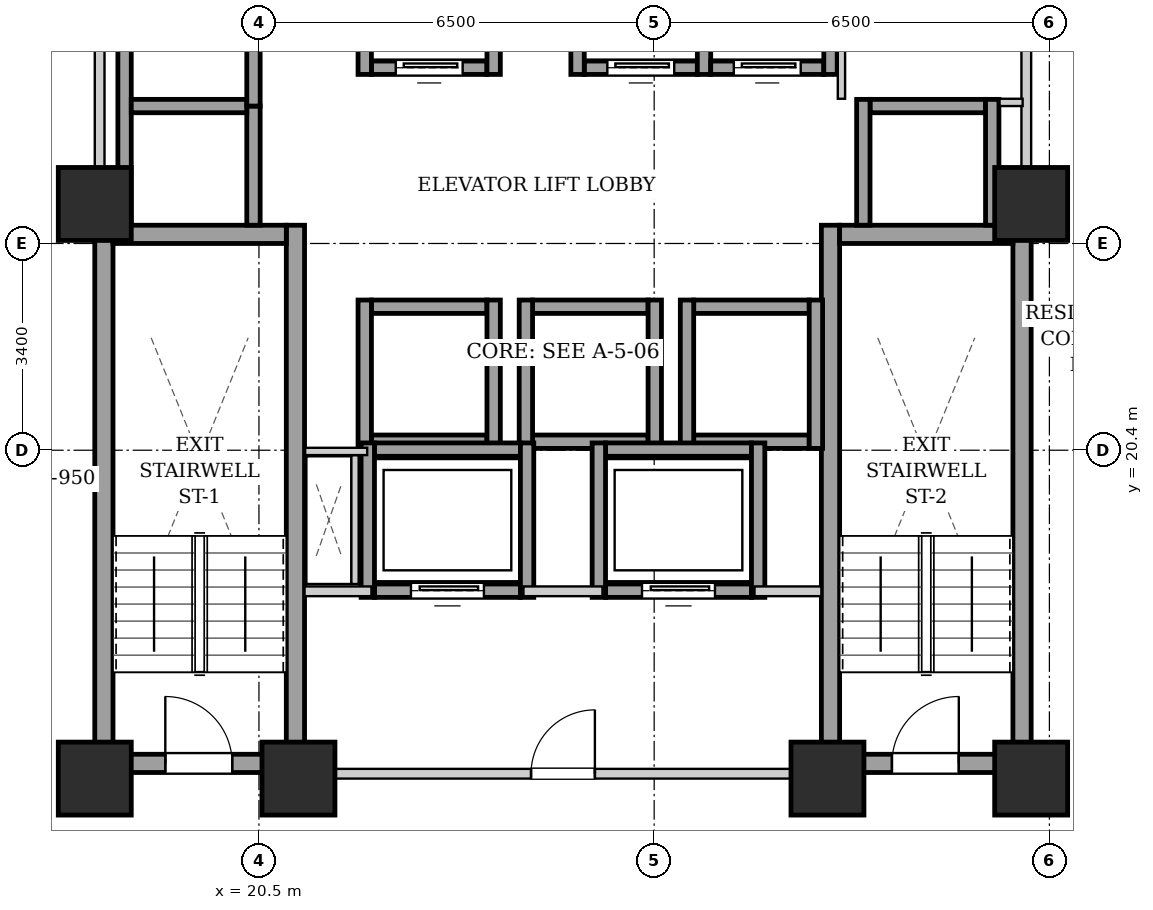
"""IFC4 building model, lengths in metres.
Left out: names, types, materials, properties, quantities, classifications, styles, units other than length and angle.
Written with IfcOpenShell. Run it as: python <this file> out.ifc"""

import sys

from ifc_helpers import new_model, si_unit, direction, frame, frame_2d, origin, origin_2d, place, context, subcontext, project, spatial, rectangle, extrude, element, fill, save


model = new_model("IFC4")
c1 = context("Model", 3, precision=1e-05, world=origin(), true_north=direction((0.0, 1.0)))
c2 = subcontext(c1, "Body", "Model", "MODEL_VIEW")
j1 = project(units=[si_unit("LENGTHUNIT", "METRE"), si_unit("PLANEANGLEUNIT", "RADIAN")], contexts=[c1])
p1 = place(None, origin())
s1 = spatial("IfcSite", under=j1, at=p1, CompositionType="ELEMENT")
p2 = place(p1, origin())
s2 = spatial("IfcBuilding", under=s1, at=p2, CompositionType="ELEMENT")
p3 = place(p2, frame((0.0, 0.0, 29.0)))
s3 = spatial("IfcBuildingStorey", under=s2, at=p3, CompositionType="ELEMENT", Elevation=29.0)
for number, where, z_axis, x_axis in (
    (1, (17.8, 15.0, 0.0), (0.0, 0.0, 1.0), (1.0, 0.0, 0.0)),
    (2, (21.15, 15.0, 0.0), (0.0, 0.0, 1.0), (1.0, 0.0, 0.0)),
    (3, (29.85, 15.0, 0.0), (0.0, 0.0, 1.0), (1.0, 0.0, 0.0)),
    (4, (33.2, 15.0, 0.0), (0.0, 0.0, 1.0), (1.0, 0.0, 0.0)),
    (5, (17.8, 24.45, 0.0), (0.0, 0.0, 1.0), (1.0, 0.0, 0.0)),
    (6, (33.2, 24.45, 0.0), (0.0, 0.0, 1.0), (1.0, 0.0, 0.0)),
):
    element("IfcColumn", number, at=place(p3, frame(where, z_axis=z_axis, x_axis=x_axis)), inside=s3, PredefinedType="COLUMN", context=c2, shape_type="SweptSolid", body=[
        extrude(rectangle(XDim=1.2, YDim=1.2, at=origin_2d()), origin(), (0.0, 0.0, 1.0), 3.2),
    ])
for number, where, z_axis, x_axis in (
    (7, (17.95, 15.1, 0.0), (0.0, 0.0, 1.0), (0.0, 1.0, 0.0)),
    (8, (21.1, 15.1, 0.0), (0.0, 0.0, 1.0), (0.0, 1.0, 0.0)),
):
    element("IfcWall", number, at=place(p3, frame(where, z_axis=z_axis, x_axis=x_axis)), inside=s3, PredefinedType="SHEAR", context=c2, shape_type="SweptSolid", body=[
        extrude(rectangle(XDim=9.0, YDim=0.3, at=frame_2d((4.5, 0.0))), origin(), (0.0, 0.0, 1.0), 2.94),
    ])
p4 = place(p3, frame((18.1, 23.95, 0.0), z_axis=(0.0, 0.0, 1.0), x_axis=(1.0, 0.0, 0.0)))
e9 = element("IfcWall", 9, at=p4, inside=s3, PredefinedType="SHEAR", context=c2, shape_type="SweptSolid", body=[
    extrude(rectangle(XDim=2.85, YDim=0.3, at=frame_2d((1.425, 0.0))), origin(), (0.0, 0.0, 1.0), 2.94),
])
p5 = place(p3, frame((18.1, 15.25, 0.0), z_axis=(0.0, 0.0, 1.0), x_axis=(1.0, 0.0, 0.0)))
e10 = element("IfcWall", 10, at=p5, inside=s3, PredefinedType="SHEAR", context=c2, shape_type="SweptSolid", body=[
    extrude(rectangle(XDim=2.85, YDim=0.3, at=frame_2d((1.425, 0.0))), origin(), (0.0, 0.0, 1.0), 2.94),
])
p6 = place(p5, frame((0.86, 0.0, 0.0)))
e11 = element("IfcOpeningElement", 11, at=p6, cuts=e10, PredefinedType="OPENING", context=c2, shape_type="SweptSolid", body=[
    extrude(rectangle(XDim=1.1, YDim=2.05, at=frame_2d((0.55, 1.025))), frame((0.0, 0.16, 0.0), z_axis=(0.0, -1.0, 0.0), x_axis=(1.0, 0.0, 0.0)), (0.0, 0.0, 1.0), 0.32),
])
for number, where, z_axis, x_axis in (
    (12, (29.9, 15.1, 0.0), (0.0, 0.0, 1.0), (0.0, 1.0, 0.0)),
    (13, (33.05, 15.1, 0.0), (0.0, 0.0, 1.0), (0.0, 1.0, 0.0)),
):
    element("IfcWall", number, at=place(p3, frame(where, z_axis=z_axis, x_axis=x_axis)), inside=s3, PredefinedType="SHEAR", context=c2, shape_type="SweptSolid", body=[
        extrude(rectangle(XDim=9.0, YDim=0.3, at=frame_2d((4.5, 0.0))), origin(), (0.0, 0.0, 1.0), 2.94),
    ])
p7 = place(p3, frame((30.05, 23.95, 0.0), z_axis=(0.0, 0.0, 1.0), x_axis=(1.0, 0.0, 0.0)))
e14 = element("IfcWall", 14, at=p7, inside=s3, PredefinedType="SHEAR", context=c2, shape_type="SweptSolid", body=[
    extrude(rectangle(XDim=2.85, YDim=0.3, at=frame_2d((1.425, 0.0))), origin(), (0.0, 0.0, 1.0), 2.94),
])
p8 = place(p3, frame((30.05, 15.25, 0.0), z_axis=(0.0, 0.0, 1.0), x_axis=(1.0, 0.0, 0.0)))
e15 = element("IfcWall", 15, at=p8, inside=s3, PredefinedType="SHEAR", context=c2, shape_type="SweptSolid", body=[
    extrude(rectangle(XDim=2.85, YDim=0.3, at=frame_2d((1.425, 0.0))), origin(), (0.0, 0.0, 1.0), 2.94),
])
p9 = place(p8, frame((0.86, 0.0, 0.0)))
e16 = element("IfcOpeningElement", 16, at=p9, cuts=e15, PredefinedType="OPENING", context=c2, shape_type="SweptSolid", body=[
    extrude(rectangle(XDim=1.1, YDim=2.05, at=frame_2d((0.55, 1.025))), frame((0.0, 0.16, 0.0), z_axis=(0.0, -1.0, 0.0), x_axis=(1.0, 0.0, 0.0)), (0.0, 0.0, 1.0), 0.32),
])
p10 = place(p3, frame((22.35, 26.69, 0.0), z_axis=(0.0, 0.0, 1.0), x_axis=(1.0, 0.0, 0.0)))
e17 = element("IfcWall", 17, at=p10, inside=s3, PredefinedType="SHEAR", context=c2, shape_type="SweptSolid", body=[
    extrude(rectangle(XDim=1.9, YDim=0.22, at=frame_2d((0.95, 0.0))), origin(), (0.0, 0.0, 1.0), 2.94),
])
p11 = place(p10, frame((0.4, 0.0, 0.0)))
e18 = element("IfcOpeningElement", 18, at=p11, cuts=e17, PredefinedType="OPENING", context=c2, shape_type="SweptSolid", body=[
    extrude(rectangle(XDim=1.1, YDim=2.15, at=frame_2d((0.55, 1.075))), frame((0.0, 0.12, 0.0), z_axis=(0.0, -1.0, 0.0), x_axis=(1.0, 0.0, 0.0)), (0.0, 0.0, 1.0), 0.24),
])
for number, where, z_axis, x_axis in (
    (19, (22.24, 26.58, 0.0), (0.0, 0.0, 1.0), (0.0, 1.0, 0.0)),
    (20, (24.36, 26.58, 0.0), (0.0, 0.0, 1.0), (0.0, 1.0, 0.0)),
):
    element("IfcWall", number, at=place(p3, frame(where, z_axis=z_axis, x_axis=x_axis)), inside=s3, PredefinedType="SHEAR", context=c2, shape_type="SweptSolid", body=[
        extrude(rectangle(XDim=2.44, YDim=0.22, at=frame_2d((1.22, 0.0))), origin(), (0.0, 0.0, 1.0), 2.94),
    ])
p12 = place(p3, frame((25.85, 26.69, 0.0), z_axis=(0.0, 0.0, 1.0), x_axis=(1.0, 0.0, 0.0)))
e21 = element("IfcWall", 21, at=p12, inside=s3, PredefinedType="SHEAR", context=c2, shape_type="SweptSolid", body=[
    extrude(rectangle(XDim=1.86, YDim=0.22, at=frame_2d((0.93, 0.0))), origin(), (0.0, 0.0, 1.0), 2.94),
])
p13 = place(p12, frame((0.38, 0.0, 0.0)))
e22 = element("IfcOpeningElement", 22, at=p13, cuts=e21, PredefinedType="OPENING", context=c2, shape_type="SweptSolid", body=[
    extrude(rectangle(XDim=1.1, YDim=2.15, at=frame_2d((0.55, 1.075))), frame((0.0, 0.12, 0.0), z_axis=(0.0, -1.0, 0.0), x_axis=(1.0, 0.0, 0.0)), (0.0, 0.0, 1.0), 0.24),
])
for number, where, z_axis, x_axis in (
    (23, (25.74, 26.58, 0.0), (0.0, 0.0, 1.0), (0.0, 1.0, 0.0)),
    (24, (27.82, 26.58, 0.0), (0.0, 0.0, 1.0), (0.0, 1.0, 0.0)),
):
    element("IfcWall", number, at=place(p3, frame(where, z_axis=z_axis, x_axis=x_axis)), inside=s3, PredefinedType="SHEAR", context=c2, shape_type="SweptSolid", body=[
        extrude(rectangle(XDim=2.44, YDim=0.22, at=frame_2d((1.22, 0.0))), origin(), (0.0, 0.0, 1.0), 2.94),
    ])
p14 = place(p3, frame((27.93, 26.69, 0.0), z_axis=(0.0, 0.0, 1.0), x_axis=(1.0, 0.0, 0.0)))
e25 = element("IfcWall", 25, at=p14, inside=s3, PredefinedType="SHEAR", context=c2, shape_type="SweptSolid", body=[
    extrude(rectangle(XDim=1.86, YDim=0.22, at=frame_2d((0.93, 0.0))), origin(), (0.0, 0.0, 1.0), 2.94),
])
p15 = place(p14, frame((0.38, 0.0, 0.0)))
e26 = element("IfcOpeningElement", 26, at=p15, cuts=e25, PredefinedType="OPENING", context=c2, shape_type="SweptSolid", body=[
    extrude(rectangle(XDim=1.1, YDim=2.15, at=frame_2d((0.55, 1.075))), frame((0.0, 0.12, 0.0), z_axis=(0.0, -1.0, 0.0), x_axis=(1.0, 0.0, 0.0)), (0.0, 0.0, 1.0), 0.24),
])
p16 = place(p3, frame((29.9, 26.58, 0.0), z_axis=(0.0, 0.0, 1.0), x_axis=(0.0, 1.0, 0.0)))
e27 = element("IfcWall", 27, at=p16, inside=s3, PredefinedType="SHEAR", context=c2, shape_type="SweptSolid", body=[
    extrude(rectangle(XDim=2.44, YDim=0.22, at=frame_2d((1.22, 0.0))), origin(), (0.0, 0.0, 1.0), 2.94),
])
for number, where, z_axis, x_axis in (
    (28, (22.35, 20.54, 0.0), (0.0, 0.0, 1.0), (1.0, 0.0, 0.0)),
    (29, (22.35, 22.76, 0.0), (0.0, 0.0, 1.0), (1.0, 0.0, 0.0)),
):
    element("IfcWall", number, at=place(p3, frame(where, z_axis=z_axis, x_axis=x_axis)), inside=s3, PredefinedType="SHEAR", context=c2, shape_type="SweptSolid", body=[
        extrude(rectangle(XDim=1.9, YDim=0.22, at=frame_2d((0.95, 0.0))), origin(), (0.0, 0.0, 1.0), 2.94),
    ])
for number, where, z_axis, x_axis in (
    (30, (22.24, 20.43, 0.0), (0.0, 0.0, 1.0), (0.0, 1.0, 0.0)),
    (31, (24.36, 20.43, 0.0), (0.0, 0.0, 1.0), (0.0, 1.0, 0.0)),
):
    element("IfcWall", number, at=place(p3, frame(where, z_axis=z_axis, x_axis=x_axis)), inside=s3, PredefinedType="SHEAR", context=c2, shape_type="SweptSolid", body=[
        extrude(rectangle(XDim=2.44, YDim=0.22, at=frame_2d((1.22, 0.0))), origin(), (0.0, 0.0, 1.0), 2.94),
    ])
for number, where, z_axis, x_axis in (
    (32, (25.0, 20.54, 0.0), (0.0, 0.0, 1.0), (1.0, 0.0, 0.0)),
    (33, (25.0, 22.76, 0.0), (0.0, 0.0, 1.0), (1.0, 0.0, 0.0)),
):
    element("IfcWall", number, at=place(p3, frame(where, z_axis=z_axis, x_axis=x_axis)), inside=s3, PredefinedType="SHEAR", context=c2, shape_type="SweptSolid", body=[
        extrude(rectangle(XDim=1.9, YDim=0.22, at=frame_2d((0.95, 0.0))), origin(), (0.0, 0.0, 1.0), 2.94),
    ])
for number, where, z_axis, x_axis in (
    (34, (24.89, 20.43, 0.0), (0.0, 0.0, 1.0), (0.0, 1.0, 0.0)),
    (35, (27.01, 20.43, 0.0), (0.0, 0.0, 1.0), (0.0, 1.0, 0.0)),
):
    element("IfcWall", number, at=place(p3, frame(where, z_axis=z_axis, x_axis=x_axis)), inside=s3, PredefinedType="SHEAR", context=c2, shape_type="SweptSolid", body=[
        extrude(rectangle(XDim=2.44, YDim=0.22, at=frame_2d((1.22, 0.0))), origin(), (0.0, 0.0, 1.0), 2.94),
    ])
for number, where, z_axis, x_axis in (
    (36, (27.65, 20.54, 0.0), (0.0, 0.0, 1.0), (1.0, 0.0, 0.0)),
    (37, (27.65, 22.76, 0.0), (0.0, 0.0, 1.0), (1.0, 0.0, 0.0)),
):
    element("IfcWall", number, at=place(p3, frame(where, z_axis=z_axis, x_axis=x_axis)), inside=s3, PredefinedType="SHEAR", context=c2, shape_type="SweptSolid", body=[
        extrude(rectangle(XDim=1.9, YDim=0.22, at=frame_2d((0.95, 0.0))), origin(), (0.0, 0.0, 1.0), 2.94),
    ])
for number, where, z_axis, x_axis in (
    (38, (27.54, 20.43, 0.0), (0.0, 0.0, 1.0), (0.0, 1.0, 0.0)),
    (39, (29.66, 20.43, 0.0), (0.0, 0.0, 1.0), (0.0, 1.0, 0.0)),
):
    element("IfcWall", number, at=place(p3, frame(where, z_axis=z_axis, x_axis=x_axis)), inside=s3, PredefinedType="SHEAR", context=c2, shape_type="SweptSolid", body=[
        extrude(rectangle(XDim=2.44, YDim=0.22, at=frame_2d((1.22, 0.0))), origin(), (0.0, 0.0, 1.0), 2.94),
    ])
p17 = place(p3, frame((18.29, 24.1, 0.0), z_axis=(0.0, 0.0, 1.0), x_axis=(0.0, 1.0, 0.0)))
e40 = element("IfcWall", 40, at=p17, inside=s3, PredefinedType="SHEAR", context=c2, shape_type="SweptSolid", body=[
    extrude(rectangle(XDim=4.14, YDim=0.22, at=frame_2d((2.07, 0.0))), origin(), (0.0, 0.0, 1.0), 2.94),
])
p18 = place(p3, frame((20.41, 24.1, 0.0), z_axis=(0.0, 0.0, 1.0), x_axis=(0.0, 1.0, 0.0)))
e41 = element("IfcWall", 41, at=p18, inside=s3, PredefinedType="SHEAR", context=c2, shape_type="SweptSolid", body=[
    extrude(rectangle(XDim=1.96, YDim=0.22, at=frame_2d((0.98, 0.0))), origin(), (0.0, 0.0, 1.0), 2.94),
])
p19 = place(p3, frame((18.4, 26.06, 0.0), z_axis=(0.0, 0.0, 1.0), x_axis=(1.0, 0.0, 0.0)))
e42 = element("IfcWall", 42, at=p19, inside=s3, PredefinedType="SHEAR", context=c2, shape_type="SweptSolid", body=[
    extrude(rectangle(XDim=1.9, YDim=0.22, at=frame_2d((0.95, 0.0))), origin(), (0.0, 0.0, 1.0), 2.94),
])
p20 = place(p3, frame((20.41, 26.06, 0.0), z_axis=(0.0, 0.0, 1.0), x_axis=(0.0, 1.0, 0.0)))
e43 = element("IfcWall", 43, at=p20, inside=s3, PredefinedType="SHEAR", context=c2, shape_type="SweptSolid", body=[
    extrude(rectangle(XDim=2.18, YDim=0.22, at=frame_2d((1.09, 0.0))), origin(), (0.0, 0.0, 1.0), 2.94),
])
p21 = place(p3, frame((30.55, 26.06, 0.0), z_axis=(0.0, 0.0, 1.0), x_axis=(1.0, 0.0, 0.0)))
e44 = element("IfcWall", 44, at=p21, inside=s3, PredefinedType="SHEAR", context=c2, shape_type="SweptSolid", body=[
    extrude(rectangle(XDim=1.9, YDim=0.22, at=frame_2d((0.95, 0.0))), origin(), (0.0, 0.0, 1.0), 2.94),
])
for number, where, z_axis, x_axis in (
    (45, (30.44, 24.1, 0.0), (0.0, 0.0, 1.0), (0.0, 1.0, 0.0)),
    (46, (32.56, 24.1, 0.0), (0.0, 0.0, 1.0), (0.0, 1.0, 0.0)),
):
    element("IfcWall", number, at=place(p3, frame(where, z_axis=z_axis, x_axis=x_axis)), inside=s3, PredefinedType="SHEAR", context=c2, shape_type="SweptSolid", body=[
        extrude(rectangle(XDim=2.07, YDim=0.22, at=frame_2d((1.035, 0.0))), origin(), (0.0, 0.0, 1.0), 2.94),
    ])
p22 = place(p3, frame((22.4, 18.09, 0.0), z_axis=(0.0, 0.0, 1.0), x_axis=(1.0, 0.0, 0.0)))
e47 = element("IfcWall", 47, at=p22, inside=s3, PredefinedType="SHEAR", context=c2, shape_type="SweptSolid", body=[
    extrude(rectangle(XDim=2.4, YDim=0.22, at=frame_2d((1.2, 0.0))), origin(), (0.0, 0.0, 1.0), 2.94),
])
p23 = place(p22, frame((0.6, 0.0, 0.0)))
e48 = element("IfcOpeningElement", 48, at=p23, cuts=e47, PredefinedType="OPENING", context=c2, shape_type="SweptSolid", body=[
    extrude(rectangle(XDim=1.2, YDim=2.15, at=frame_2d((0.6, 1.075))), frame((0.0, 0.12, 0.0), z_axis=(0.0, -1.0, 0.0), x_axis=(1.0, 0.0, 0.0)), (0.0, 0.0, 1.0), 0.24),
])
p24 = place(p3, frame((22.4, 20.41, 0.0), z_axis=(0.0, 0.0, 1.0), x_axis=(1.0, 0.0, 0.0)))
e49 = element("IfcWall", 49, at=p24, inside=s3, PredefinedType="SHEAR", context=c2, shape_type="SweptSolid", body=[
    extrude(rectangle(XDim=2.4, YDim=0.22, at=frame_2d((1.2, 0.0))), origin(), (0.0, 0.0, 1.0), 2.94),
])
for number, where, z_axis, x_axis in (
    (50, (22.29, 17.98, 0.0), (0.0, 0.0, 1.0), (0.0, 1.0, 0.0)),
    (51, (24.91, 17.98, 0.0), (0.0, 0.0, 1.0), (0.0, 1.0, 0.0)),
):
    element("IfcWall", number, at=place(p3, frame(where, z_axis=z_axis, x_axis=x_axis)), inside=s3, PredefinedType="SHEAR", context=c2, shape_type="SweptSolid", body=[
        extrude(rectangle(XDim=2.54, YDim=0.22, at=frame_2d((1.27, 0.0))), origin(), (0.0, 0.0, 1.0), 2.94),
    ])
p25 = place(p3, frame((26.2, 18.09, 0.0), z_axis=(0.0, 0.0, 1.0), x_axis=(1.0, 0.0, 0.0)))
e52 = element("IfcWall", 52, at=p25, inside=s3, PredefinedType="SHEAR", context=c2, shape_type="SweptSolid", body=[
    extrude(rectangle(XDim=2.4, YDim=0.22, at=frame_2d((1.2, 0.0))), origin(), (0.0, 0.0, 1.0), 2.94),
])
p26 = place(p25, frame((0.6, 0.0, 0.0)))
e53 = element("IfcOpeningElement", 53, at=p26, cuts=e52, PredefinedType="OPENING", context=c2, shape_type="SweptSolid", body=[
    extrude(rectangle(XDim=1.2, YDim=2.15, at=frame_2d((0.6, 1.075))), frame((0.0, 0.12, 0.0), z_axis=(0.0, -1.0, 0.0), x_axis=(1.0, 0.0, 0.0)), (0.0, 0.0, 1.0), 0.24),
])
p27 = place(p3, frame((26.2, 20.41, 0.0), z_axis=(0.0, 0.0, 1.0), x_axis=(1.0, 0.0, 0.0)))
e54 = element("IfcWall", 54, at=p27, inside=s3, PredefinedType="SHEAR", context=c2, shape_type="SweptSolid", body=[
    extrude(rectangle(XDim=2.4, YDim=0.22, at=frame_2d((1.2, 0.0))), origin(), (0.0, 0.0, 1.0), 2.94),
])
for number, where, z_axis, x_axis in (
    (55, (26.09, 17.98, 0.0), (0.0, 0.0, 1.0), (0.0, 1.0, 0.0)),
    (56, (28.71, 17.98, 0.0), (0.0, 0.0, 1.0), (0.0, 1.0, 0.0)),
):
    element("IfcWall", number, at=place(p3, frame(where, z_axis=z_axis, x_axis=x_axis)), inside=s3, PredefinedType="SHEAR", context=c2, shape_type="SweptSolid", body=[
        extrude(rectangle(XDim=2.54, YDim=0.22, at=frame_2d((1.27, 0.0))), origin(), (0.0, 0.0, 1.0), 2.94),
    ])
p28 = place(p3, frame((21.25, 15.08, 0.0), z_axis=(0.0, 0.0, 1.0), x_axis=(1.0, 0.0, 0.0)))
e57 = element("IfcWall", 57, at=p28, inside=s3, PredefinedType="PARTITIONING", context=c2, shape_type="SweptSolid", body=[
    extrude(rectangle(XDim=8.5, YDim=0.16, at=frame_2d((4.25, 0.0))), origin(), (0.0, 0.0, 1.0), 2.155),
])
p29 = place(p28, frame((3.725, 0.0, 0.0)))
e58 = element("IfcOpeningElement", 58, at=p29, cuts=e57, PredefinedType="OPENING", context=c2, shape_type="SweptSolid", body=[
    extrude(rectangle(XDim=1.05, YDim=2.05, at=frame_2d((0.525, 1.025))), frame((0.0, 0.09, 0.0), z_axis=(0.0, -1.0, 0.0), x_axis=(1.0, 0.0, 0.0)), (0.0, 0.0, 1.0), 0.18),
])
p30 = place(p3, frame((21.25, 18.08, 0.0), z_axis=(0.0, 0.0, 1.0), x_axis=(1.0, 0.0, 0.0)))
e59 = element("IfcWall", 59, at=p30, inside=s3, PredefinedType="PARTITIONING", context=c2, shape_type="SweptSolid", body=[
    extrude(rectangle(XDim=1.1, YDim=0.16, at=frame_2d((0.55, 0.0))), origin(), (0.0, 0.0, 1.0), 2.94),
])
p31 = place(p3, frame((24.85, 18.08, 0.0), z_axis=(0.0, 0.0, 1.0), x_axis=(1.0, 0.0, 0.0)))
e60 = element("IfcWall", 60, at=p31, inside=s3, PredefinedType="PARTITIONING", context=c2, shape_type="SweptSolid", body=[
    extrude(rectangle(XDim=1.3, YDim=0.16, at=frame_2d((0.65, 0.0))), origin(), (0.0, 0.0, 1.0), 2.94),
])
p32 = place(p3, frame((28.65, 18.08, 0.0), z_axis=(0.0, 0.0, 1.0), x_axis=(1.0, 0.0, 0.0)))
e61 = element("IfcWall", 61, at=p32, inside=s3, PredefinedType="PARTITIONING", context=c2, shape_type="SweptSolid", body=[
    extrude(rectangle(XDim=1.1, YDim=0.16, at=frame_2d((0.55, 0.0))), origin(), (0.0, 0.0, 1.0), 2.94),
])
for number, where, z_axis, x_axis in (
    (62, (17.88, 24.12, 0.0), (0.0, 0.0, 1.0), (0.0, 1.0, 0.0)),
    (63, (33.12, 24.12, 0.0), (0.0, 0.0, 1.0), (0.0, 1.0, 0.0)),
):
    element("IfcWall", number, at=place(p3, frame(where, z_axis=z_axis, x_axis=x_axis)), inside=s3, PredefinedType="PARTITIONING", context=c2, shape_type="SweptSolid", body=[
        extrude(rectangle(XDim=4.76, YDim=0.16, at=frame_2d((2.38, 0.0))), origin(), (0.0, 0.0, 1.0), 2.275),
    ])
p33 = place(p3, frame((22.08, 18.2, 0.0), z_axis=(0.0, 0.0, 1.0), x_axis=(0.0, 1.0, 0.0)))
e64 = element("IfcWall", 64, at=p33, inside=s3, PredefinedType="PARTITIONING", context=c2, shape_type="SweptSolid", body=[
    extrude(rectangle(XDim=2.12, YDim=0.12, at=frame_2d((1.06, 0.0))), origin(), (0.0, 0.0, 1.0), 2.94),
])
p34 = place(p3, frame((22.28, 20.38, 0.0), z_axis=(0.0, 0.0, 1.0), x_axis=(-1.0, 0.0, 0.0)))
e65 = element("IfcWall", 65, at=p34, inside=s3, PredefinedType="PARTITIONING", context=c2, shape_type="SweptSolid", body=[
    extrude(rectangle(XDim=1.02, YDim=0.12, at=frame_2d((0.51, 0.0))), origin(), (0.0, 0.0, 1.0), 2.94),
])
p35 = place(p3, frame((30.08, 26.18, 0.0), z_axis=(0.0, 0.0, 1.0), x_axis=(0.0, 1.0, 0.0)))
e66 = element("IfcWall", 66, at=p35, inside=s3, PredefinedType="PARTITIONING", context=c2, shape_type="SweptSolid", body=[
    extrude(rectangle(XDim=2.68, YDim=0.12, at=frame_2d((1.34, 0.0))), origin(), (0.0, 0.0, 1.0), 2.94),
])
p36 = place(p3, frame((32.68, 26.12, 0.0), z_axis=(0.0, 0.0, 1.0), x_axis=(1.0, 0.0, 0.0)))
e67 = element("IfcWall", 67, at=p36, inside=s3, PredefinedType="PARTITIONING", context=c2, shape_type="SweptSolid", body=[
    extrude(rectangle(XDim=0.38, YDim=0.12, at=frame_2d((0.19, 0.0))), origin(), (0.0, 0.0, 1.0), 2.94),
])
p37 = place(p6, origin())
e68 = element("IfcDoor", 68, at=p37, inside=s3, OperationType="SINGLE_SWING_LEFT", PredefinedType="DOOR", context=c2, shape_type="SweptSolid", body=[
    extrude(rectangle(XDim=1.1, YDim=2.05, at=frame_2d((0.55, 1.025))), frame((0.0, 0.025, 0.0), z_axis=(0.0, -1.0, 0.0), x_axis=(1.0, 0.0, 0.0)), (0.0, 0.0, 1.0), 0.05),
])
fill(e11, e68)
p38 = place(p9, origin())
e69 = element("IfcDoor", 69, at=p38, inside=s3, OperationType="SINGLE_SWING_RIGHT", PredefinedType="DOOR", context=c2, shape_type="SweptSolid", body=[
    extrude(rectangle(XDim=1.1, YDim=2.05, at=frame_2d((0.55, 1.025))), frame((0.0, 0.025, 0.0), z_axis=(0.0, -1.0, 0.0), x_axis=(1.0, 0.0, 0.0)), (0.0, 0.0, 1.0), 0.05),
])
fill(e16, e69)
p39 = place(p11, origin())
e70 = element("IfcDoor", 70, at=p39, inside=s3, OperationType="SLIDING_TO_LEFT", PredefinedType="DOOR", context=c2, shape_type="SweptSolid", body=[
    extrude(rectangle(XDim=1.1, YDim=2.15, at=frame_2d((0.55, 1.075))), frame((0.0, 0.025, 0.0), z_axis=(0.0, -1.0, 0.0), x_axis=(1.0, 0.0, 0.0)), (0.0, 0.0, 1.0), 0.05),
])
fill(e18, e70)
p40 = place(p13, origin())
e71 = element("IfcDoor", 71, at=p40, inside=s3, OperationType="SLIDING_TO_LEFT", PredefinedType="DOOR", context=c2, shape_type="SweptSolid", body=[
    extrude(rectangle(XDim=1.1, YDim=2.15, at=frame_2d((0.55, 1.075))), frame((0.0, 0.025, 0.0), z_axis=(0.0, -1.0, 0.0), x_axis=(1.0, 0.0, 0.0)), (0.0, 0.0, 1.0), 0.05),
])
fill(e22, e71)
p41 = place(p15, origin())
e72 = element("IfcDoor", 72, at=p41, inside=s3, OperationType="SLIDING_TO_LEFT", PredefinedType="DOOR", context=c2, shape_type="SweptSolid", body=[
    extrude(rectangle(XDim=1.1, YDim=2.15, at=frame_2d((0.55, 1.075))), frame((0.0, 0.025, 0.0), z_axis=(0.0, -1.0, 0.0), x_axis=(1.0, 0.0, 0.0)), (0.0, 0.0, 1.0), 0.05),
])
fill(e26, e72)
p42 = place(p23, origin())
e73 = element("IfcDoor", 73, at=p42, inside=s3, OperationType="SLIDING_TO_LEFT", PredefinedType="DOOR", context=c2, shape_type="SweptSolid", body=[
    extrude(rectangle(XDim=1.2, YDim=2.15, at=frame_2d((0.6, 1.075))), frame((0.0, 0.025, 0.0), z_axis=(0.0, -1.0, 0.0), x_axis=(1.0, 0.0, 0.0)), (0.0, 0.0, 1.0), 0.05),
])
fill(e48, e73)
p43 = place(p26, origin())
e74 = element("IfcDoor", 74, at=p43, inside=s3, OperationType="SLIDING_TO_LEFT", PredefinedType="DOOR", context=c2, shape_type="SweptSolid", body=[
    extrude(rectangle(XDim=1.2, YDim=2.15, at=frame_2d((0.6, 1.075))), frame((0.0, 0.025, 0.0), z_axis=(0.0, -1.0, 0.0), x_axis=(1.0, 0.0, 0.0)), (0.0, 0.0, 1.0), 0.05),
])
fill(e53, e74)
p44 = place(p29, origin())
e75 = element("IfcDoor", 75, at=p44, inside=s3, OperationType="SINGLE_SWING_RIGHT", PredefinedType="DOOR", context=c2, shape_type="SweptSolid", body=[
    extrude(rectangle(XDim=1.05, YDim=2.05, at=frame_2d((0.525, 1.025))), frame((0.0, 0.025, 0.0), z_axis=(0.0, -1.0, 0.0), x_axis=(1.0, 0.0, 0.0)), (0.0, 0.0, 1.0), 0.05),
])
fill(e58, e75)
save(model, sys.argv[1])
